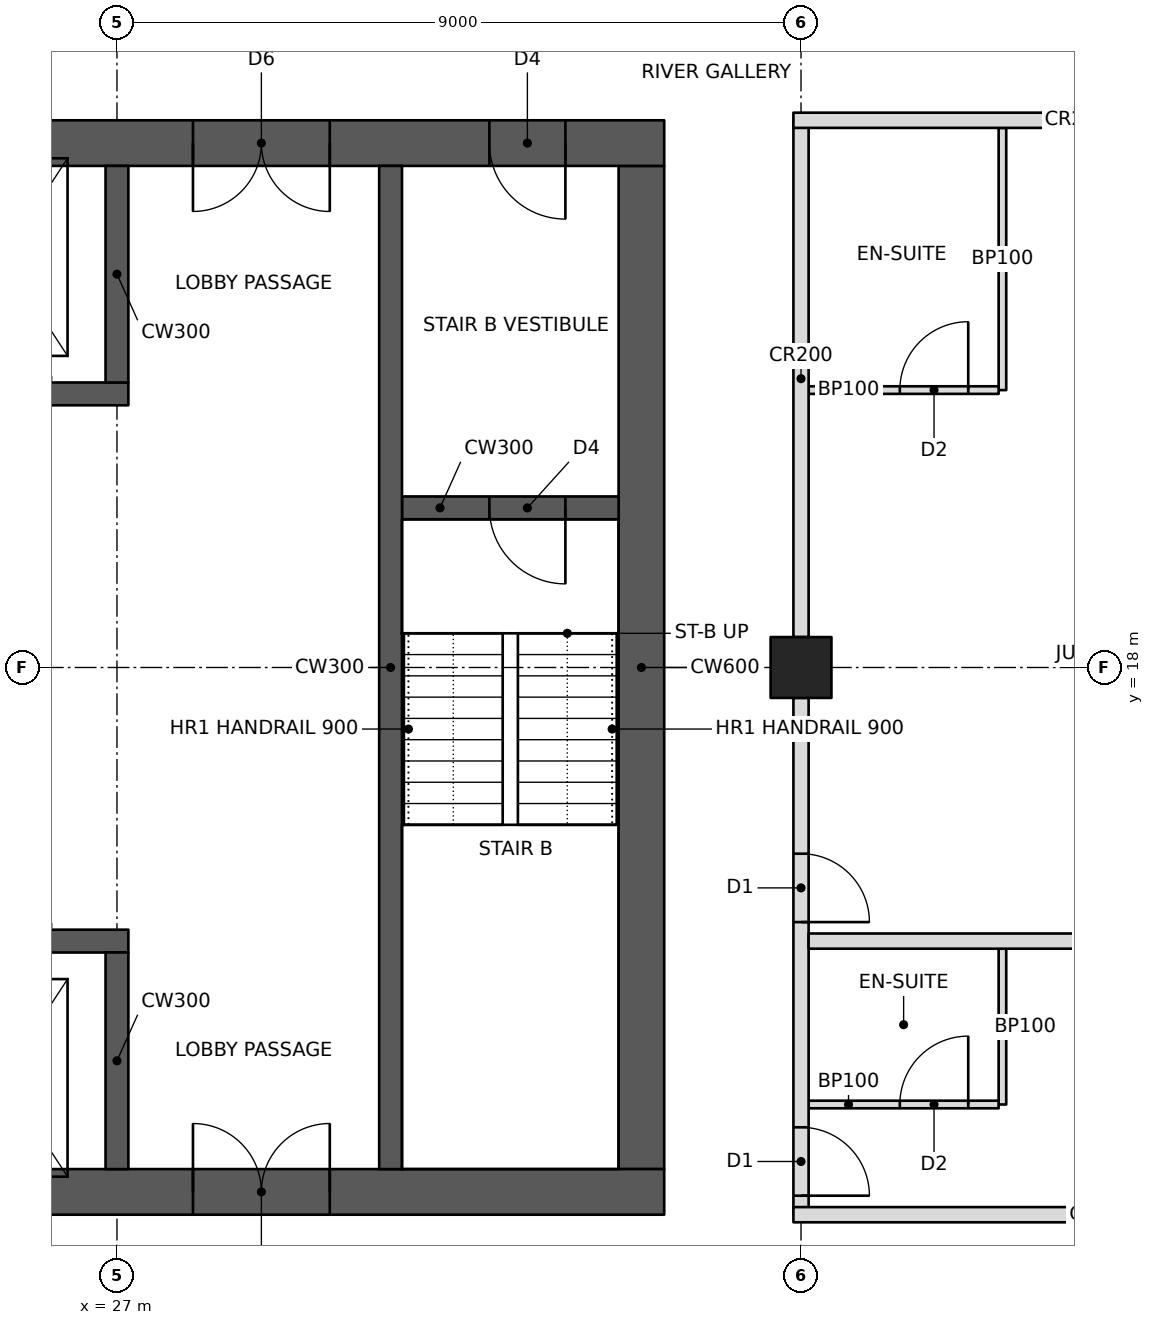
"""IFC4 building model, lengths in metres.
Left out: names, types, materials, properties, quantities, classifications, styles, units other than length and angle.
Written with IfcOpenShell. Run it as: python <this file> out.ifc"""

import sys

from ifc_helpers import new_model, si_unit, direction, frame, frame_2d, origin, origin_2d, place, context, subcontext, project, spatial, rectangle, hollow_rectangle, extrude, element, fill, save


model = new_model("IFC4")
c1 = context("Model", 3, precision=1e-05, world=origin(), true_north=direction((0.0, 1.0)))
c2 = subcontext(c1, "Body", "Model", "MODEL_VIEW")
j1 = project(units=[si_unit("LENGTHUNIT", "METRE"), si_unit("PLANEANGLEUNIT", "RADIAN")], contexts=[c1])
p1 = place(None, origin())
s1 = spatial("IfcSite", under=j1, at=p1, CompositionType="ELEMENT")
p2 = place(p1, origin())
s2 = spatial("IfcBuilding", under=s1, at=p2, CompositionType="ELEMENT")
p3 = place(p2, frame((0.0, 0.0, 211.4)))
s3 = spatial("IfcBuildingStorey", under=s2, at=p3, CompositionType="ELEMENT", Elevation=211.4)
p4 = place(p3, frame((36.0, 18.0, 0.0), z_axis=(0.0, 0.0, 1.0), x_axis=(0.0, 1.0, 0.0)))
e1 = element("IfcColumn", 1, at=p4, inside=s3, PredefinedType="COLUMN", context=c2, shape_type="SweptSolid", body=[
    extrude(hollow_rectangle(XDim=0.8, YDim=0.8, WallThickness=0.05, at=origin_2d()), origin(), (0.0, 0.0, 1.0), 3.4),
])
p5 = place(p3, frame((10.8, 11.1, 0.0), z_axis=(0.0, 0.0, 1.0), x_axis=(1.0, 0.0, 0.0)))
e2 = element("IfcWall", 2, at=p5, inside=s3, PredefinedType="SHEAR", context=c2, shape_type="SweptSolid", body=[
    extrude(rectangle(XDim=23.4, YDim=0.6, at=frame_2d((11.7, 0.0))), origin(), (0.0, 0.0, 1.0), 3.4),
])
p6 = place(p5, frame((1.0, 0.0, 0.0)))
e3 = element("IfcOpeningElement", 3, at=p6, cuts=e2, PredefinedType="OPENING", context=c2, shape_type="SweptSolid", body=[
    extrude(rectangle(XDim=1.0, YDim=2.1, at=frame_2d((0.5, 1.05))), frame((0.0, 0.31, 0.0), z_axis=(0.0, -1.0, 0.0), x_axis=(1.0, 0.0, 0.0)), (0.0, 0.0, 1.0), 0.62),
])
p7 = place(p5, frame((17.2, 0.0, 0.0)))
e4 = element("IfcOpeningElement", 4, at=p7, cuts=e2, PredefinedType="OPENING", context=c2, shape_type="SweptSolid", body=[
    extrude(rectangle(XDim=1.8, YDim=2.1, at=frame_2d((0.9, 1.05))), frame((0.0, 0.31, 0.0), z_axis=(0.0, -1.0, 0.0), x_axis=(1.0, 0.0, 0.0)), (0.0, 0.0, 1.0), 0.62),
])
p8 = place(p3, frame((10.8, 24.9, 0.0), z_axis=(0.0, 0.0, 1.0), x_axis=(1.0, 0.0, 0.0)))
e5 = element("IfcWall", 5, at=p8, inside=s3, PredefinedType="SHEAR", context=c2, shape_type="SweptSolid", body=[
    extrude(rectangle(XDim=23.4, YDim=0.6, at=frame_2d((11.7, 0.0))), origin(), (0.0, 0.0, 1.0), 3.4),
])
p9 = place(p8, frame((17.2, 0.0, 0.0)))
e6 = element("IfcOpeningElement", 6, at=p9, cuts=e5, PredefinedType="OPENING", context=c2, shape_type="SweptSolid", body=[
    extrude(rectangle(XDim=1.8, YDim=2.1, at=frame_2d((0.9, 1.05))), frame((0.0, 0.31, 0.0), z_axis=(0.0, -1.0, 0.0), x_axis=(1.0, 0.0, 0.0)), (0.0, 0.0, 1.0), 0.62),
])
p10 = place(p8, frame((21.1, 0.0, 0.0)))
e7 = element("IfcOpeningElement", 7, at=p10, cuts=e5, PredefinedType="OPENING", context=c2, shape_type="SweptSolid", body=[
    extrude(rectangle(XDim=1.0, YDim=2.1, at=frame_2d((0.5, 1.05))), frame((0.0, 0.31, 0.0), z_axis=(0.0, -1.0, 0.0), x_axis=(1.0, 0.0, 0.0)), (0.0, 0.0, 1.0), 0.62),
])
p11 = place(p8, frame((4.9, 0.0, 0.0)))
e8 = element("IfcOpeningElement", 8, at=p11, cuts=e5, PredefinedType="OPENING", context=c2, shape_type="SweptSolid", body=[
    extrude(rectangle(XDim=1.0, YDim=2.1, at=frame_2d((0.5, 1.05))), frame((0.0, 0.31, 0.0), z_axis=(0.0, -1.0, 0.0), x_axis=(1.0, 0.0, 0.0)), (0.0, 0.0, 1.0), 0.62),
])
p12 = place(p3, frame((33.9, 11.4, 0.0), z_axis=(0.0, 0.0, 1.0), x_axis=(0.0, 1.0, 0.0)))
e9 = element("IfcWall", 9, at=p12, inside=s3, PredefinedType="SHEAR", context=c2, shape_type="SweptSolid", body=[
    extrude(rectangle(XDim=13.2, YDim=0.6, at=frame_2d((6.6, 0.0))), origin(), (0.0, 0.0, 1.0), 3.4),
])
p13 = place(p3, frame((18.15, 14.4, 0.0), z_axis=(0.0, 0.0, 1.0), x_axis=(1.0, 0.0, 0.0)))
e10 = element("IfcWall", 10, at=p13, inside=s3, PredefinedType="SHEAR", context=c2, shape_type="SweptSolid", body=[
    extrude(rectangle(XDim=9.0, YDim=0.3, at=frame_2d((4.5, 0.0))), origin(), (0.0, 0.0, 1.0), 3.4),
])
p14 = place(p13, frame((0.8, 0.0, 0.0)))
e11 = element("IfcOpeningElement", 11, at=p14, cuts=e10, PredefinedType="OPENING", context=c2, shape_type="SweptSolid", body=[
    extrude(rectangle(XDim=1.1, YDim=2.1, at=frame_2d((0.55, 1.05))), frame((0.0, 0.16, 0.0), z_axis=(0.0, -1.0, 0.0), x_axis=(1.0, 0.0, 0.0)), (0.0, 0.0, 1.0), 0.32),
])
p15 = place(p13, frame((6.75, 0.0, 0.0)))
e12 = element("IfcOpeningElement", 12, at=p15, cuts=e10, PredefinedType="OPENING", context=c2, shape_type="SweptSolid", body=[
    extrude(rectangle(XDim=1.2, YDim=2.1, at=frame_2d((0.6, 1.05))), frame((0.0, 0.16, 0.0), z_axis=(0.0, -1.0, 0.0), x_axis=(1.0, 0.0, 0.0)), (0.0, 0.0, 1.0), 0.32),
])
p16 = place(p13, frame((3.8, 0.0, 0.0)))
e13 = element("IfcOpeningElement", 13, at=p16, cuts=e10, PredefinedType="OPENING", context=c2, shape_type="SweptSolid", body=[
    extrude(rectangle(XDim=1.1, YDim=2.1, at=frame_2d((0.55, 1.05))), frame((0.0, 0.16, 0.0), z_axis=(0.0, -1.0, 0.0), x_axis=(1.0, 0.0, 0.0)), (0.0, 0.0, 1.0), 0.32),
])
p17 = place(p3, frame((27.0, 11.4, 0.0), z_axis=(0.0, 0.0, 1.0), x_axis=(0.0, 1.0, 0.0)))
e14 = element("IfcWall", 14, at=p17, inside=s3, PredefinedType="SHEAR", context=c2, shape_type="SweptSolid", body=[
    extrude(rectangle(XDim=2.85, YDim=0.3, at=frame_2d((1.425, 0.0))), origin(), (0.0, 0.0, 1.0), 3.4),
])
p18 = place(p3, frame((18.15, 21.6, 0.0), z_axis=(0.0, 0.0, 1.0), x_axis=(1.0, 0.0, 0.0)))
e15 = element("IfcWall", 15, at=p18, inside=s3, PredefinedType="SHEAR", context=c2, shape_type="SweptSolid", body=[
    extrude(rectangle(XDim=9.0, YDim=0.3, at=frame_2d((4.5, 0.0))), origin(), (0.0, 0.0, 1.0), 3.4),
])
p19 = place(p18, frame((6.75, 0.0, 0.0)))
e16 = element("IfcOpeningElement", 16, at=p19, cuts=e15, PredefinedType="OPENING", context=c2, shape_type="SweptSolid", body=[
    extrude(rectangle(XDim=1.2, YDim=2.1, at=frame_2d((0.6, 1.05))), frame((0.0, 0.16, 0.0), z_axis=(0.0, -1.0, 0.0), x_axis=(1.0, 0.0, 0.0)), (0.0, 0.0, 1.0), 0.32),
])
p20 = place(p18, frame((0.8, 0.0, 0.0)))
e17 = element("IfcOpeningElement", 17, at=p20, cuts=e15, PredefinedType="OPENING", context=c2, shape_type="SweptSolid", body=[
    extrude(rectangle(XDim=1.1, YDim=2.1, at=frame_2d((0.55, 1.05))), frame((0.0, 0.16, 0.0), z_axis=(0.0, -1.0, 0.0), x_axis=(1.0, 0.0, 0.0)), (0.0, 0.0, 1.0), 0.32),
])
p21 = place(p18, frame((3.8, 0.0, 0.0)))
e18 = element("IfcOpeningElement", 18, at=p21, cuts=e15, PredefinedType="OPENING", context=c2, shape_type="SweptSolid", body=[
    extrude(rectangle(XDim=1.1, YDim=2.1, at=frame_2d((0.55, 1.05))), frame((0.0, 0.16, 0.0), z_axis=(0.0, -1.0, 0.0), x_axis=(1.0, 0.0, 0.0)), (0.0, 0.0, 1.0), 0.32),
])
p22 = place(p3, frame((27.0, 21.75, 0.0), z_axis=(0.0, 0.0, 1.0), x_axis=(0.0, 1.0, 0.0)))
e19 = element("IfcWall", 19, at=p22, inside=s3, PredefinedType="SHEAR", context=c2, shape_type="SweptSolid", body=[
    extrude(rectangle(XDim=2.85, YDim=0.3, at=frame_2d((1.425, 0.0))), origin(), (0.0, 0.0, 1.0), 3.4),
])
p23 = place(p3, frame((30.6, 11.4, 0.0), z_axis=(0.0, 0.0, 1.0), x_axis=(0.0, 1.0, 0.0)))
e20 = element("IfcWall", 20, at=p23, inside=s3, PredefinedType="SHEAR", context=c2, shape_type="SweptSolid", body=[
    extrude(rectangle(XDim=13.2, YDim=0.3, at=frame_2d((6.6, 0.0))), origin(), (0.0, 0.0, 1.0), 3.4),
])
p24 = place(p3, frame((30.75, 20.1, 0.0), z_axis=(0.0, 0.0, 1.0), x_axis=(1.0, 0.0, 0.0)))
e21 = element("IfcWall", 21, at=p24, inside=s3, PredefinedType="SHEAR", context=c2, shape_type="SweptSolid", body=[
    extrude(rectangle(XDim=2.85, YDim=0.3, at=frame_2d((1.425, 0.0))), origin(), (0.0, 0.0, 1.0), 3.4),
])
p25 = place(p24, frame((1.15, 0.0, 0.0)))
e22 = element("IfcOpeningElement", 22, at=p25, cuts=e21, PredefinedType="OPENING", context=c2, shape_type="SweptSolid", body=[
    extrude(rectangle(XDim=1.0, YDim=2.1, at=frame_2d((0.5, 1.05))), frame((0.0, 0.16, 0.0), z_axis=(0.0, -1.0, 0.0), x_axis=(1.0, 0.0, 0.0)), (0.0, 0.0, 1.0), 0.32),
])
p26 = place(p3, frame((36.0, 10.8, 0.0), z_axis=(0.0, 0.0, 1.0), x_axis=(0.0, 1.0, 0.0)))
e23 = element("IfcWall", 23, at=p26, inside=s3, PredefinedType="PARTITIONING", context=c2, shape_type="SweptSolid", body=[
    extrude(rectangle(XDim=6.8, YDim=0.2, at=frame_2d((3.4, 0.0))), origin(), (0.0, 0.0, 1.0), 2.405),
])
p27 = place(p26, frame((0.25, 0.0, 0.0)))
e24 = element("IfcOpeningElement", 24, at=p27, cuts=e23, PredefinedType="OPENING", context=c2, shape_type="SweptSolid", body=[
    extrude(rectangle(XDim=0.9, YDim=2.1, at=frame_2d((0.45, 1.05))), frame((0.0, 0.11, 0.0), z_axis=(0.0, -1.0, 0.0), x_axis=(1.0, 0.0, 0.0)), (0.0, 0.0, 1.0), 0.22),
])
p28 = place(p26, frame((3.85, 0.0, 0.0)))
e25 = element("IfcOpeningElement", 25, at=p28, cuts=e23, PredefinedType="OPENING", context=c2, shape_type="SweptSolid", body=[
    extrude(rectangle(XDim=0.9, YDim=2.1, at=frame_2d((0.45, 1.05))), frame((0.0, 0.11, 0.0), z_axis=(0.0, -1.0, 0.0), x_axis=(1.0, 0.0, 0.0)), (0.0, 0.0, 1.0), 0.22),
])
p29 = place(p3, frame((36.0, 18.4, 0.0), z_axis=(0.0, 0.0, 1.0), x_axis=(0.0, 1.0, 0.0)))
e26 = element("IfcWall", 26, at=p29, inside=s3, PredefinedType="PARTITIONING", context=c2, shape_type="SweptSolid", body=[
    extrude(rectangle(XDim=6.8, YDim=0.2, at=frame_2d((3.4, 0.0))), origin(), (0.0, 0.0, 1.0), 2.405),
])
p30 = place(p3, frame((35.9, 10.8, 0.0), z_axis=(0.0, 0.0, 1.0), x_axis=(1.0, 0.0, 0.0)))
e27 = element("IfcWall", 27, at=p30, inside=s3, PredefinedType="PARTITIONING", context=c2, shape_type="SweptSolid", body=[
    extrude(rectangle(XDim=8.1, YDim=0.2, at=frame_2d((4.05, 0.0))), origin(), (0.0, 0.0, 1.0), 2.404),
])
p31 = place(p3, frame((35.9, 25.2, 0.0), z_axis=(0.0, 0.0, 1.0), x_axis=(1.0, 0.0, 0.0)))
e28 = element("IfcWall", 28, at=p31, inside=s3, PredefinedType="PARTITIONING", context=c2, shape_type="SweptSolid", body=[
    extrude(rectangle(XDim=7.45, YDim=0.2, at=frame_2d((3.725, 0.0))), origin(), (0.0, 0.0, 1.0), 2.404),
])
p32 = place(p3, frame((36.1, 14.4, 0.0), z_axis=(0.0, 0.0, 1.0), x_axis=(1.0, 0.0, 0.0)))
e29 = element("IfcWall", 29, at=p32, inside=s3, PredefinedType="PARTITIONING", context=c2, shape_type="SweptSolid", body=[
    extrude(rectangle(XDim=7.9, YDim=0.2, at=frame_2d((3.95, 0.0))), origin(), (0.0, 0.0, 1.0), 2.404),
])
p33 = place(p3, frame((38.65, 12.25, 0.0), z_axis=(0.0, 0.0, 1.0), x_axis=(0.0, 1.0, 0.0)))
e30 = element("IfcWall", 30, at=p33, inside=s3, PredefinedType="PARTITIONING", context=c2, shape_type="SweptSolid", body=[
    extrude(rectangle(XDim=2.05, YDim=0.1, at=frame_2d((1.025, 0.0))), origin(), (0.0, 0.0, 1.0), 3.2),
])
p34 = place(p3, frame((36.1, 12.25, 0.0), z_axis=(0.0, 0.0, 1.0), x_axis=(1.0, 0.0, 0.0)))
e31 = element("IfcWall", 31, at=p34, inside=s3, PredefinedType="PARTITIONING", context=c2, shape_type="SweptSolid", body=[
    extrude(rectangle(XDim=2.5, YDim=0.1, at=frame_2d((1.25, 0.0))), origin(), (0.0, 0.0, 1.0), 2.404),
])
p35 = place(p34, frame((1.2, 0.0, 0.0)))
e32 = element("IfcOpeningElement", 32, at=p35, cuts=e31, PredefinedType="OPENING", context=c2, shape_type="SweptSolid", body=[
    extrude(rectangle(XDim=0.9, YDim=2.1, at=frame_2d((0.45, 1.05))), frame((0.0, 0.06, 0.0), z_axis=(0.0, -1.0, 0.0), x_axis=(1.0, 0.0, 0.0)), (0.0, 0.0, 1.0), 0.12),
])
p36 = place(p3, frame((38.65, 21.65, 0.0), z_axis=(0.0, 0.0, 1.0), x_axis=(0.0, 1.0, 0.0)))
e33 = element("IfcWall", 33, at=p36, inside=s3, PredefinedType="PARTITIONING", context=c2, shape_type="SweptSolid", body=[
    extrude(rectangle(XDim=3.45, YDim=0.1, at=frame_2d((1.725, 0.0))), origin(), (0.0, 0.0, 1.0), 3.2),
])
p37 = place(p3, frame((36.1, 21.65, 0.0), z_axis=(0.0, 0.0, 1.0), x_axis=(1.0, 0.0, 0.0)))
e34 = element("IfcWall", 34, at=p37, inside=s3, PredefinedType="PARTITIONING", context=c2, shape_type="SweptSolid", body=[
    extrude(rectangle(XDim=2.5, YDim=0.1, at=frame_2d((1.25, 0.0))), origin(), (0.0, 0.0, 1.0), 2.404),
])
p38 = place(p37, frame((1.2, 0.0, 0.0)))
e35 = element("IfcOpeningElement", 35, at=p38, cuts=e34, PredefinedType="OPENING", context=c2, shape_type="SweptSolid", body=[
    extrude(rectangle(XDim=0.9, YDim=2.1, at=frame_2d((0.45, 1.05))), frame((0.0, 0.06, 0.0), z_axis=(0.0, -1.0, 0.0), x_axis=(1.0, 0.0, 0.0)), (0.0, 0.0, 1.0), 0.12),
])
p39 = place(p35, origin())
e36 = element("IfcDoor", 36, at=p39, inside=s3, OperationType="SINGLE_SWING_RIGHT", PredefinedType="DOOR", context=c2, shape_type="SweptSolid", body=[
    extrude(rectangle(XDim=0.9, YDim=2.1, at=frame_2d((0.45, 1.05))), frame((0.0, 0.025, 0.0), z_axis=(0.0, -1.0, 0.0), x_axis=(1.0, 0.0, 0.0)), (0.0, 0.0, 1.0), 0.05),
])
fill(e32, e36)
p40 = place(p27, frame((0.9, 0.0, 0.0), z_axis=(0.0, 0.0, 1.0), x_axis=(-1.0, 0.0, 0.0)))
e37 = element("IfcDoor", 37, at=p40, inside=s3, OperationType="SINGLE_SWING_RIGHT", PredefinedType="DOOR", context=c2, shape_type="SweptSolid", body=[
    extrude(rectangle(XDim=0.9, YDim=2.1, at=frame_2d((0.45, 1.05))), frame((0.0, 0.025, 0.0), z_axis=(0.0, -1.0, 0.0), x_axis=(1.0, 0.0, 0.0)), (0.0, 0.0, 1.0), 0.05),
])
fill(e24, e37)
p41 = place(p38, origin())
e38 = element("IfcDoor", 38, at=p41, inside=s3, OperationType="SINGLE_SWING_RIGHT", PredefinedType="DOOR", context=c2, shape_type="SweptSolid", body=[
    extrude(rectangle(XDim=0.9, YDim=2.1, at=frame_2d((0.45, 1.05))), frame((0.0, 0.025, 0.0), z_axis=(0.0, -1.0, 0.0), x_axis=(1.0, 0.0, 0.0)), (0.0, 0.0, 1.0), 0.05),
])
fill(e35, e38)
p42 = place(p28, frame((0.9, 0.0, 0.0), z_axis=(0.0, 0.0, 1.0), x_axis=(-1.0, 0.0, 0.0)))
e39 = element("IfcDoor", 39, at=p42, inside=s3, OperationType="SINGLE_SWING_RIGHT", PredefinedType="DOOR", context=c2, shape_type="SweptSolid", body=[
    extrude(rectangle(XDim=0.9, YDim=2.1, at=frame_2d((0.45, 1.05))), frame((0.0, 0.025, 0.0), z_axis=(0.0, -1.0, 0.0), x_axis=(1.0, 0.0, 0.0)), (0.0, 0.0, 1.0), 0.05),
])
fill(e25, e39)
p43 = place(p7, origin())
e40 = element("IfcDoor", 40, at=p43, inside=s3, OperationType="DOUBLE_DOOR_SINGLE_SWING", PredefinedType="DOOR", context=c2, shape_type="SweptSolid", body=[
    extrude(rectangle(XDim=1.8, YDim=2.1, at=frame_2d((0.9, 1.05))), frame((0.0, 0.025, 0.0), z_axis=(0.0, -1.0, 0.0), x_axis=(1.0, 0.0, 0.0)), (0.0, 0.0, 1.0), 0.05),
])
fill(e4, e40)
p44 = place(p9, frame((1.8, 0.0, 0.0), z_axis=(0.0, 0.0, 1.0), x_axis=(-1.0, 0.0, 0.0)))
e41 = element("IfcDoor", 41, at=p44, inside=s3, OperationType="DOUBLE_DOOR_SINGLE_SWING", PredefinedType="DOOR", context=c2, shape_type="SweptSolid", body=[
    extrude(rectangle(XDim=1.8, YDim=2.1, at=frame_2d((0.9, 1.05))), frame((0.0, 0.025, 0.0), z_axis=(0.0, -1.0, 0.0), x_axis=(1.0, 0.0, 0.0)), (0.0, 0.0, 1.0), 0.05),
])
fill(e6, e41)
p45 = place(p10, frame((1.0, 0.0, 0.0), z_axis=(0.0, 0.0, 1.0), x_axis=(-1.0, 0.0, 0.0)))
e42 = element("IfcDoor", 42, at=p45, inside=s3, OperationType="SINGLE_SWING_LEFT", PredefinedType="DOOR", context=c2, shape_type="SweptSolid", body=[
    extrude(rectangle(XDim=1.0, YDim=2.1, at=frame_2d((0.5, 1.05))), frame((0.0, 0.025, 0.0), z_axis=(0.0, -1.0, 0.0), x_axis=(1.0, 0.0, 0.0)), (0.0, 0.0, 1.0), 0.05),
])
fill(e7, e42)
p46 = place(p25, frame((1.0, 0.0, 0.0), z_axis=(0.0, 0.0, 1.0), x_axis=(-1.0, 0.0, 0.0)))
e43 = element("IfcDoor", 43, at=p46, inside=s3, OperationType="SINGLE_SWING_LEFT", PredefinedType="DOOR", context=c2, shape_type="SweptSolid", body=[
    extrude(rectangle(XDim=1.0, YDim=2.1, at=frame_2d((0.5, 1.05))), frame((0.0, 0.025, 0.0), z_axis=(0.0, -1.0, 0.0), x_axis=(1.0, 0.0, 0.0)), (0.0, 0.0, 1.0), 0.05),
])
fill(e22, e43)
save(model, sys.argv[1])
